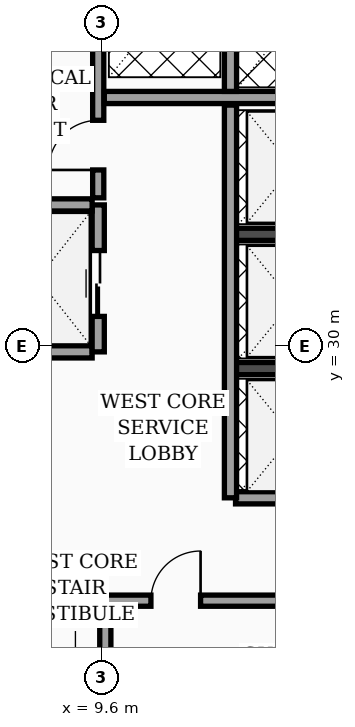
"""IFC4 building model, lengths in metres.
Left out: names, types, materials, properties, quantities, classifications, styles, units other than length and angle.
Written with IfcOpenShell. Run it as: python <this file> out.ifc"""

import sys

from ifc_helpers import new_model, si_unit, direction, frame, frame_2d, origin, place, context, subcontext, project, spatial, rectangle, extrude, element, fill, save


model = new_model("IFC4")
c1 = context("Model", 3, precision=1e-05, world=origin(), true_north=direction((0.0, 1.0)))
c2 = subcontext(c1, "Body", "Model", "MODEL_VIEW")
j1 = project(units=[si_unit("LENGTHUNIT", "METRE"), si_unit("PLANEANGLEUNIT", "RADIAN")], contexts=[c1])
p1 = place(None, origin())
s1 = spatial("IfcSite", under=j1, at=p1, CompositionType="ELEMENT")
p2 = place(p1, origin())
s2 = spatial("IfcBuilding", under=s1, at=p2, CompositionType="ELEMENT")
p3 = place(p2, frame((0.0, 0.0, 135.4)))
s3 = spatial("IfcBuildingStorey", under=s2, at=p3, CompositionType="ELEMENT", Elevation=135.4)
for number, where, z_axis, x_axis in (
    (1, (12.18, 29.55, 0.0), (0.0, 0.0, 1.0), (1.0, 0.0, 0.0)),
    (2, (12.18, 32.2, 0.0), (0.0, 0.0, 1.0), (1.0, 0.0, 0.0)),
):
    element("IfcWall", number, at=place(p3, frame(where, z_axis=z_axis, x_axis=x_axis)), inside=s3, PredefinedType="SOLIDWALL", context=c2, shape_type="SweptSolid", body=[
        extrude(rectangle(XDim=2.395, YDim=0.24, at=frame_2d((1.198, 0.0))), origin(), (0.0, 0.0, 1.0), 3.52),
    ])
p4 = place(p3, frame((4.645, 29.88, 0.0), z_axis=(0.0, 0.0, 1.0), x_axis=(1.0, 0.0, 0.0)))
e3 = element("IfcWall", 3, at=p4, inside=s3, PredefinedType="SOLIDWALL", context=c2, shape_type="SweptSolid", body=[
    extrude(rectangle(XDim=4.775, YDim=0.24, at=frame_2d((2.387, 0.0))), origin(), (0.0, 0.0, 1.0), 3.52),
])
p5 = place(p4, frame((0.45, 0.0, 0.0)))
e4 = element("IfcOpeningElement", 4, at=p5, cuts=e3, PredefinedType="OPENING", context=c2, shape_type="SweptSolid", body=[
    extrude(rectangle(XDim=1.3, YDim=2.35, at=frame_2d((0.65, 1.175))), frame((0.0, 0.13, 0.0), z_axis=(0.0, -1.0, 0.0), x_axis=(1.0, 0.0, 0.0)), (0.0, 0.0, 1.0), 0.26),
])
p6 = place(p3, frame((9.54, 29.88, 0.0), z_axis=(0.0, 0.0, 1.0), x_axis=(0.0, 1.0, 0.0)))
e5 = element("IfcWall", 5, at=p6, inside=s3, PredefinedType="SOLIDWALL", context=c2, shape_type="SweptSolid", body=[
    extrude(rectangle(XDim=2.9, YDim=0.24, at=frame_2d((1.45, 0.0))), origin(), (0.0, 0.0, 1.0), 3.52),
])
p7 = place(p6, frame((0.7, 0.0, 0.0)))
e6 = element("IfcOpeningElement", 6, at=p7, cuts=e5, PredefinedType="OPENING", context=c2, shape_type="SweptSolid", body=[
    extrude(rectangle(XDim=1.3, YDim=2.35, at=frame_2d((0.65, 1.175))), frame((0.0, 0.13, 0.0), z_axis=(0.0, -1.0, 0.0), x_axis=(1.0, 0.0, 0.0)), (0.0, 0.0, 1.0), 0.26),
])
p8 = place(p3, frame((4.645, 32.78, 0.0), z_axis=(0.0, 0.0, 1.0), x_axis=(1.0, 0.0, 0.0)))
e7 = element("IfcWall", 7, at=p8, inside=s3, PredefinedType="SOLIDWALL", context=c2, shape_type="SweptSolid", body=[
    extrude(rectangle(XDim=4.775, YDim=0.24, at=frame_2d((2.387, 0.0))), origin(), (0.0, 0.0, 1.0), 3.17),
])
p9 = place(p3, frame((9.68, 17.245, 0.0), z_axis=(0.0, 0.0, 1.0), x_axis=(0.0, 1.0, 0.0)))
e8 = element("IfcWall", 8, at=p9, inside=s3, PredefinedType="SOLIDWALL", context=c2, shape_type="SweptSolid", body=[
    extrude(rectangle(XDim=7.755, YDim=0.22, at=frame_2d((3.877, 0.0))), origin(), (0.0, 0.0, 1.0), 3.52),
])
p10 = place(p3, frame((4.645, 35.38, 0.0), z_axis=(0.0, 0.0, 1.0), x_axis=(1.0, 0.0, 0.0)))
e9 = element("IfcWall", 9, at=p10, inside=s3, PredefinedType="PARTITIONING", context=c2, shape_type="SweptSolid", body=[
    extrude(rectangle(XDim=4.775, YDim=0.16, at=frame_2d((2.387, 0.0))), origin(), (0.0, 0.0, 1.0), 3.52),
])
p11 = place(p10, frame((1.3, 0.0, 0.0)))
e10 = element("IfcOpeningElement", 10, at=p11, cuts=e9, PredefinedType="OPENING", context=c2, shape_type="SweptSolid", body=[
    extrude(rectangle(XDim=0.98, YDim=2.15, at=frame_2d((0.49, 1.075))), frame((0.0, 0.09, 0.0), z_axis=(0.0, -1.0, 0.0), x_axis=(1.0, 0.0, 0.0)), (0.0, 0.0, 1.0), 0.18),
])
p12 = place(p3, frame((9.54, 32.92, 0.0), z_axis=(0.0, 0.0, 1.0), x_axis=(0.0, 1.0, 0.0)))
e11 = element("IfcWall", 11, at=p12, inside=s3, PredefinedType="SOLIDWALL", context=c2, shape_type="SweptSolid", body=[
    extrude(rectangle(XDim=5.035, YDim=0.22, at=frame_2d((2.518, 0.0))), origin(), (0.0, 0.0, 1.0), 3.52),
])
p13 = place(p12, frame((0.55, 0.0, 0.0)))
e12 = element("IfcOpeningElement", 12, at=p13, cuts=e11, PredefinedType="OPENING", context=c2, shape_type="SweptSolid", body=[
    extrude(rectangle(XDim=0.98, YDim=2.15, at=frame_2d((0.49, 1.075))), frame((0.0, 0.12, 0.0), z_axis=(0.0, -1.0, 0.0), x_axis=(1.0, 0.0, 0.0)), (0.0, 0.0, 1.0), 0.24),
])
p14 = place(p3, frame((9.68, 24.97, 0.0), z_axis=(0.0, 0.0, 1.0), x_axis=(1.0, 0.0, 0.0)))
e13 = element("IfcWall", 13, at=p14, inside=s3, PredefinedType="SOLIDWALL", context=c2, shape_type="SweptSolid", body=[
    extrude(rectangle(XDim=4.875, YDim=0.22, at=frame_2d((2.438, 0.0))), origin(), (0.0, 0.0, 1.0), 2.82),
])
p15 = place(p14, frame((0.9, 0.0, 0.0)))
e14 = element("IfcOpeningElement", 14, at=p15, cuts=e13, PredefinedType="OPENING", context=c2, shape_type="SweptSolid", body=[
    extrude(rectangle(XDim=0.98, YDim=2.15, at=frame_2d((0.49, 1.075))), frame((0.0, 0.12, 0.0), z_axis=(0.0, -1.0, 0.0), x_axis=(1.0, 0.0, 0.0)), (0.0, 0.0, 1.0), 0.24),
])
p16 = place(p3, frame((12.25, 27.0, 0.0), z_axis=(0.0, 0.0, 1.0), x_axis=(1.0, 0.0, 0.0)))
e15 = element("IfcWall", 15, at=p16, inside=s3, PredefinedType="SOLIDWALL", context=c2, shape_type="SweptSolid", body=[
    extrude(rectangle(XDim=2.305, YDim=0.24, at=frame_2d((1.152, 0.0))), origin(), (0.0, 0.0, 1.0), 3.52),
])
p17 = place(p3, frame((12.15, 27.0, 0.0), z_axis=(0.0, 0.0, 1.0), x_axis=(0.0, 1.0, 0.0)))
e16 = element("IfcWall", 16, at=p17, inside=s3, PredefinedType="SOLIDWALL", context=c2, shape_type="SweptSolid", body=[
    extrude(rectangle(XDim=7.75, YDim=0.24, at=frame_2d((3.875, 0.0))), origin(), (0.0, 0.0, 1.0), 3.52),
])
p18 = place(p3, frame((9.66, 34.9, 0.0), z_axis=(0.0, 0.0, 1.0), x_axis=(1.0, 0.0, 0.0)))
e17 = element("IfcWall", 17, at=p18, inside=s3, PredefinedType="SOLIDWALL", context=c2, shape_type="SweptSolid", body=[
    extrude(rectangle(XDim=4.895, YDim=0.24, at=frame_2d((2.448, 0.0))), origin(), (0.0, 0.0, 1.0), 3.52),
])
p19 = place(p3, frame((12.15, 35.02, 0.0), z_axis=(0.0, 0.0, 1.0), x_axis=(0.0, 1.0, 0.0)))
e18 = element("IfcWall", 18, at=p19, inside=s3, PredefinedType="SOLIDWALL", context=c2, shape_type="SweptSolid", body=[
    extrude(rectangle(XDim=2.935, YDim=0.24, at=frame_2d((1.468, 0.0))), origin(), (0.0, 0.0, 1.0), 3.52),
])
p20 = place(p7, origin())
e19 = element("IfcDoor", 19, at=p20, inside=s3, OperationType="DOUBLE_DOOR_SLIDING", PredefinedType="DOOR", context=c2, shape_type="SweptSolid", body=[
    extrude(rectangle(XDim=1.3, YDim=2.35, at=frame_2d((0.65, 1.175))), frame((0.0, 0.025, 0.0), z_axis=(0.0, -1.0, 0.0), x_axis=(1.0, 0.0, 0.0)), (0.0, 0.0, 1.0), 0.05),
])
fill(e6, e19)
p21 = place(p13, origin())
e20 = element("IfcDoor", 20, at=p21, inside=s3, OperationType="SINGLE_SWING_LEFT", PredefinedType="DOOR", context=c2, shape_type="SweptSolid", body=[
    extrude(rectangle(XDim=0.98, YDim=2.15, at=frame_2d((0.49, 1.075))), frame((0.0, 0.025, 0.0), z_axis=(0.0, -1.0, 0.0), x_axis=(1.0, 0.0, 0.0)), (0.0, 0.0, 1.0), 0.05),
])
fill(e12, e20)
p22 = place(p15, origin())
e21 = element("IfcDoor", 21, at=p22, inside=s3, OperationType="SINGLE_SWING_RIGHT", PredefinedType="DOOR", context=c2, shape_type="SweptSolid", body=[
    extrude(rectangle(XDim=0.98, YDim=2.15, at=frame_2d((0.49, 1.075))), frame((0.0, 0.025, 0.0), z_axis=(0.0, -1.0, 0.0), x_axis=(1.0, 0.0, 0.0)), (0.0, 0.0, 1.0), 0.05),
])
fill(e14, e21)
save(model, sys.argv[1])
